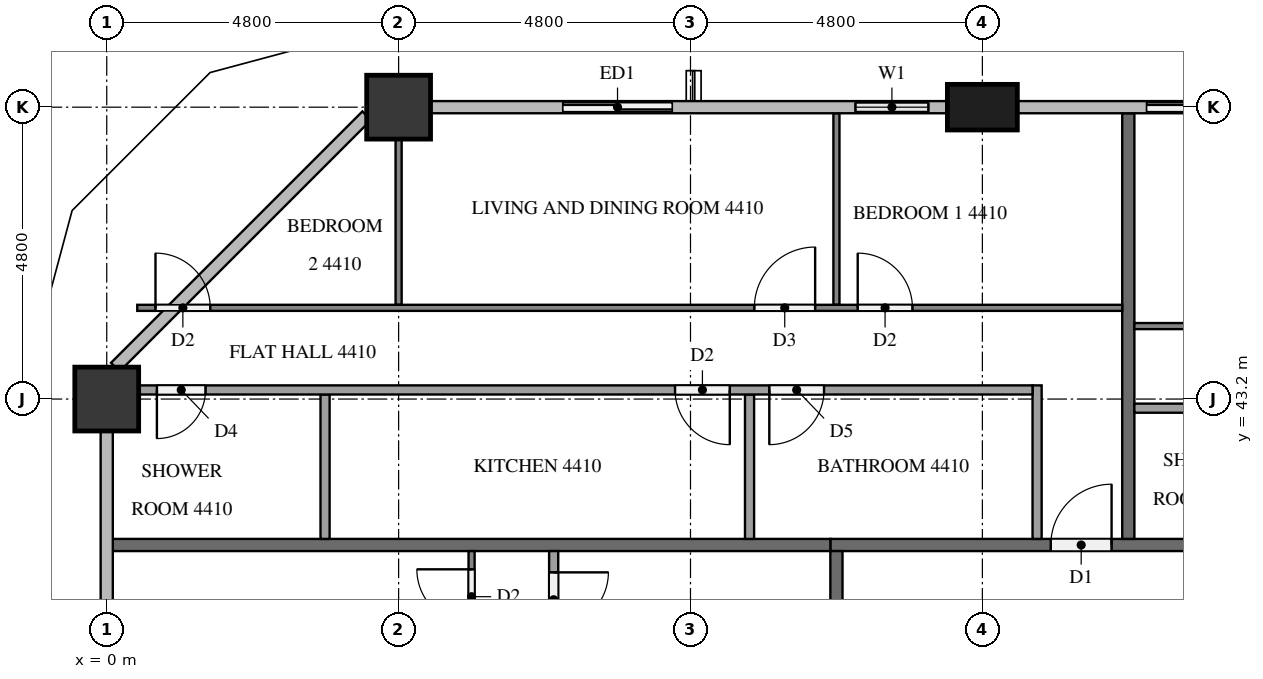
"""IFC4 building model, lengths in metres.
Left out: names, types, materials, properties, quantities, classifications, styles, units other than length and angle.
Written with IfcOpenShell. Run it as: python <this file> out.ifc"""

import sys

from ifc_helpers import new_model, si_unit, direction, frame, frame_2d, origin, origin_2d, place, context, subcontext, project, spatial, rectangle, extrude, element, fill, save


model = new_model("IFC4")
c1 = context("Model", 3, precision=1e-05, world=origin(), true_north=direction((0.0, 1.0)))
c2 = subcontext(c1, "Body", "Model", "MODEL_VIEW")
j1 = project(units=[si_unit("LENGTHUNIT", "METRE"), si_unit("PLANEANGLEUNIT", "RADIAN")], contexts=[c1])
p1 = place(None, origin())
s1 = spatial("IfcSite", under=j1, at=p1, CompositionType="ELEMENT")
p2 = place(p1, origin())
s2 = spatial("IfcBuilding", under=s1, at=p2, CompositionType="ELEMENT")
p3 = place(p2, frame((0.0, 0.0, 170.0)))
s3 = spatial("IfcBuildingStorey", under=s2, at=p3, CompositionType="ELEMENT", Elevation=170.0)
p4 = place(p3, frame((14.4, 48.0, 0.0), z_axis=(0.0, 0.0, 1.0), x_axis=(1.0, 0.0, 0.0)))
e1 = element("IfcColumn", 1, at=p4, inside=s3, PredefinedType="COLUMN", context=c2, shape_type="SweptSolid", body=[
    extrude(rectangle(XDim=1.15, YDim=0.75, at=origin_2d()), origin(), (0.0, 0.0, 1.0), 3.1),
])
for number, where, z_axis, x_axis in (
    (2, (4.8, 48.0, 0.0), (0.0, 0.0, 1.0), (1.0, 0.0, 0.0)),
    (3, (0.0, 43.2, 0.0), (0.0, 0.0, 1.0), (1.0, 0.0, 0.0)),
):
    element("IfcColumn", number, at=place(p3, frame(where, z_axis=z_axis, x_axis=x_axis)), inside=s3, PredefinedType="COLUMN", context=c2, shape_type="SweptSolid", body=[
        extrude(rectangle(XDim=1.05, YDim=1.05, at=origin_2d()), origin(), (0.0, 0.0, 1.0), 3.1),
    ])
p5 = place(p3, frame((19.2, 48.0, 0.0), z_axis=(0.0, 0.0, 1.0), x_axis=(-1.0, 0.0, 0.0)))
e4 = element("IfcWall", 4, at=p5, inside=s3, PredefinedType="SOLIDWALL", context=c2, shape_type="SweptSolid", body=[
    extrude(rectangle(XDim=2.4, YDim=0.15, at=frame_2d((1.2, 0.0))), origin(), (0.0, 0.0, 1.0), 3.1),
])
p6 = place(p5, frame((0.3, 0.0, 0.0)))
e5 = element("IfcOpeningElement", 5, at=p6, cuts=e4, PredefinedType="OPENING", context=c2, shape_type="SweptSolid", body=[
    extrude(rectangle(XDim=1.8, YDim=2.4, at=frame_2d((0.9, 1.2))), frame((0.0, 0.085, 0.0), z_axis=(0.0, -1.0, 0.0), x_axis=(1.0, 0.0, 0.0)), (0.0, 0.0, 1.0), 0.17),
])
p7 = place(p3, frame((13.825, 48.0, 0.0), z_axis=(0.0, 0.0, 1.0), x_axis=(-1.0, 0.0, 0.0)))
e6 = element("IfcWall", 6, at=p7, inside=s3, PredefinedType="SOLIDWALL", context=c2, shape_type="SweptSolid", body=[
    extrude(rectangle(XDim=1.825, YDim=0.15, at=frame_2d((0.913, 0.0))), origin(), (0.0, 0.0, 1.0), 3.1),
])
p8 = place(p7, frame((0.312, 0.0, 0.9)))
e7 = element("IfcOpeningElement", 7, at=p8, cuts=e6, PredefinedType="OPENING", context=c2, shape_type="SweptSolid", body=[
    extrude(rectangle(XDim=1.2, YDim=1.4, at=frame_2d((0.6, 0.7))), frame((0.0, 0.085, 0.0), z_axis=(0.0, -1.0, 0.0), x_axis=(1.0, 0.0, 0.0)), (0.0, 0.0, 1.0), 0.17),
])
p9 = place(p3, frame((9.6, 48.0, 0.0), z_axis=(0.0, 0.0, 1.0), x_axis=(-1.0, 0.0, 0.0)))
e8 = element("IfcWall", 8, at=p9, inside=s3, PredefinedType="SOLIDWALL", context=c2, shape_type="SweptSolid", body=[
    extrude(rectangle(XDim=2.4, YDim=0.15, at=frame_2d((1.2, 0.0))), origin(), (0.0, 0.0, 1.0), 3.1),
])
p10 = place(p9, frame((0.3, 0.0, 0.0)))
e9 = element("IfcOpeningElement", 9, at=p10, cuts=e8, PredefinedType="OPENING", context=c2, shape_type="SweptSolid", body=[
    extrude(rectangle(XDim=1.8, YDim=2.4, at=frame_2d((0.9, 1.2))), frame((0.0, 0.085, 0.0), z_axis=(0.0, -1.0, 0.0), x_axis=(1.0, 0.0, 0.0)), (0.0, 0.0, 1.0), 0.17),
])
p11 = place(p3, frame((11.9, 40.8, 0.0), z_axis=(0.0, 0.0, 1.0), x_axis=(1.0, 0.0, 0.0)))
e10 = element("IfcWall", 10, at=p11, inside=s3, PredefinedType="PARTITIONING", context=c2, shape_type="SweptSolid", body=[
    extrude(rectangle(XDim=38.6, YDim=0.2, at=frame_2d((19.3, 0.0))), origin(), (0.0, 0.0, 1.0), 3.1),
])
p12 = place(p11, frame((37.175, 0.0, 0.0)))
e11 = element("IfcOpeningElement", 11, at=p12, cuts=e10, PredefinedType="OPENING", context=c2, shape_type="SweptSolid", body=[
    extrude(rectangle(XDim=1.1, YDim=2.1, at=frame_2d((0.55, 1.05))), frame((0.0, 0.11, 0.0), z_axis=(0.0, -1.0, 0.0), x_axis=(1.0, 0.0, 0.0)), (0.0, 0.0, 1.0), 0.22),
])
p13 = place(p11, frame((18.025, 0.0, 0.0)))
e12 = element("IfcOpeningElement", 12, at=p13, cuts=e10, PredefinedType="OPENING", context=c2, shape_type="SweptSolid", body=[
    extrude(rectangle(XDim=1.0, YDim=2.1, at=frame_2d((0.5, 1.05))), frame((0.0, 0.11, 0.0), z_axis=(0.0, -1.0, 0.0), x_axis=(1.0, 0.0, 0.0)), (0.0, 0.0, 1.0), 0.22),
])
p14 = place(p11, frame((3.625, 0.0, 0.0)))
e13 = element("IfcOpeningElement", 13, at=p14, cuts=e10, PredefinedType="OPENING", context=c2, shape_type="SweptSolid", body=[
    extrude(rectangle(XDim=1.0, YDim=2.1, at=frame_2d((0.5, 1.05))), frame((0.0, 0.11, 0.0), z_axis=(0.0, -1.0, 0.0), x_axis=(1.0, 0.0, 0.0)), (0.0, 0.0, 1.0), 0.22),
])
p15 = place(p3, frame((12.0, 12.1, 0.0), z_axis=(0.0, 0.0, 1.0), x_axis=(0.0, 1.0, 0.0)))
e14 = element("IfcWall", 14, at=p15, inside=s3, PredefinedType="PARTITIONING", context=c2, shape_type="SweptSolid", body=[
    extrude(rectangle(XDim=28.6, YDim=0.2, at=frame_2d((14.3, 0.0))), origin(), (0.0, 0.0, 1.0), 3.1),
])
p16 = place(p15, frame((19.375, 0.0, 0.0)))
e15 = element("IfcOpeningElement", 15, at=p16, cuts=e14, PredefinedType="OPENING", context=c2, shape_type="SweptSolid", body=[
    extrude(rectangle(XDim=1.0, YDim=2.1, at=frame_2d((0.5, 1.05))), frame((0.0, 0.11, 0.0), z_axis=(0.0, -1.0, 0.0), x_axis=(1.0, 0.0, 0.0)), (0.0, 0.0, 1.0), 0.22),
])
p17 = place(p15, frame((4.975, 0.0, 0.0)))
e16 = element("IfcOpeningElement", 16, at=p17, cuts=e14, PredefinedType="OPENING", context=c2, shape_type="SweptSolid", body=[
    extrude(rectangle(XDim=1.0, YDim=2.1, at=frame_2d((0.5, 1.05))), frame((0.0, 0.11, 0.0), z_axis=(0.0, -1.0, 0.0), x_axis=(1.0, 0.0, 0.0)), (0.0, 0.0, 1.0), 0.22),
])
p18 = place(p15, frame((3.425, 0.0, 0.0)))
e17 = element("IfcOpeningElement", 17, at=p18, cuts=e14, PredefinedType="OPENING", context=c2, shape_type="SweptSolid", body=[
    extrude(rectangle(XDim=1.0, YDim=2.1, at=frame_2d((0.5, 1.05))), frame((0.0, 0.11, 0.0), z_axis=(0.0, -1.0, 0.0), x_axis=(1.0, 0.0, 0.0)), (0.0, 0.0, 1.0), 0.22),
])
p19 = place(p3, frame((16.8, 47.9, 0.0), z_axis=(0.0, 0.0, 1.0), x_axis=(0.0, -1.0, 0.0)))
e18 = element("IfcWall", 18, at=p19, inside=s3, PredefinedType="PARTITIONING", context=c2, shape_type="SweptSolid", body=[
    extrude(rectangle(XDim=7.0, YDim=0.2, at=frame_2d((3.5, 0.0))), origin(), (0.0, 0.0, 1.0), 3.1),
])
p20 = place(p3, frame((0.1, 40.8, 0.0), z_axis=(0.0, 0.0, 1.0), x_axis=(1.0, 0.0, 0.0)))
e19 = element("IfcWall", 19, at=p20, inside=s3, PredefinedType="PARTITIONING", context=c2, shape_type="SweptSolid", body=[
    extrude(rectangle(XDim=11.8, YDim=0.2, at=frame_2d((5.9, 0.0))), origin(), (0.0, 0.0, 1.0), 3.1),
])
p21 = place(p3, frame((16.9, 44.4, 0.0), z_axis=(0.0, 0.0, 1.0), x_axis=(1.0, 0.0, 0.0)))
e20 = element("IfcWall", 20, at=p21, inside=s3, PredefinedType="PARTITIONING", context=c2, shape_type="SweptSolid", body=[
    extrude(rectangle(XDim=14.2, YDim=0.1, at=frame_2d((7.1, 0.0))), origin(), (0.0, 0.0, 1.0), 3.1),
])
p22 = place(p21, frame((13.0, 0.0, 0.0)))
e21 = element("IfcOpeningElement", 21, at=p22, cuts=e20, PredefinedType="OPENING", context=c2, shape_type="SweptSolid", body=[
    extrude(rectangle(XDim=0.9, YDim=2.1, at=frame_2d((0.45, 1.05))), frame((0.0, 0.06, 0.0), z_axis=(0.0, -1.0, 0.0), x_axis=(1.0, 0.0, 0.0)), (0.0, 0.0, 1.0), 0.12),
])
p23 = place(p21, frame((5.05, 0.0, 0.0)))
e22 = element("IfcOpeningElement", 22, at=p23, cuts=e20, PredefinedType="OPENING", context=c2, shape_type="SweptSolid", body=[
    extrude(rectangle(XDim=0.9, YDim=2.1, at=frame_2d((0.45, 1.05))), frame((0.0, 0.06, 0.0), z_axis=(0.0, -1.0, 0.0), x_axis=(1.0, 0.0, 0.0)), (0.0, 0.0, 1.0), 0.12),
])
p24 = place(p21, frame((3.35, 0.0, 0.0)))
e23 = element("IfcOpeningElement", 23, at=p24, cuts=e20, PredefinedType="OPENING", context=c2, shape_type="SweptSolid", body=[
    extrude(rectangle(XDim=1.0, YDim=2.1, at=frame_2d((0.5, 1.05))), frame((0.0, 0.06, 0.0), z_axis=(0.0, -1.0, 0.0), x_axis=(1.0, 0.0, 0.0)), (0.0, 0.0, 1.0), 0.12),
])
p25 = place(p3, frame((29.625, 43.05, 0.0), z_axis=(0.0, 0.0, 1.0), x_axis=(-1.0, 0.0, 0.0)))
e24 = element("IfcWall", 24, at=p25, inside=s3, PredefinedType="PARTITIONING", context=c2, shape_type="SweptSolid", body=[
    extrude(rectangle(XDim=12.725, YDim=0.15, at=frame_2d((6.363, 0.0))), origin(), (0.0, 0.0, 1.0), 3.1),
])
p26 = place(p25, frame((0.3, 0.0, 0.0)))
e25 = element("IfcOpeningElement", 25, at=p26, cuts=e24, PredefinedType="OPENING", context=c2, shape_type="SweptSolid", body=[
    extrude(rectangle(XDim=0.9, YDim=2.1, at=frame_2d((0.45, 1.05))), frame((0.0, 0.085, 0.0), z_axis=(0.0, -1.0, 0.0), x_axis=(1.0, 0.0, 0.0)), (0.0, 0.0, 1.0), 0.17),
])
p27 = place(p25, frame((8.563, 0.0, 0.0)))
e26 = element("IfcOpeningElement", 26, at=p27, cuts=e24, PredefinedType="OPENING", context=c2, shape_type="SweptSolid", body=[
    extrude(rectangle(XDim=0.9, YDim=2.1, at=frame_2d((0.45, 1.05))), frame((0.0, 0.085, 0.0), z_axis=(0.0, -1.0, 0.0), x_axis=(1.0, 0.0, 0.0)), (0.0, 0.0, 1.0), 0.17),
])
p28 = place(p25, frame((10.114, 0.0, 0.0)))
e27 = element("IfcOpeningElement", 27, at=p28, cuts=e24, PredefinedType="OPENING", context=c2, shape_type="SweptSolid", body=[
    extrude(rectangle(XDim=0.8, YDim=2.1, at=frame_2d((0.4, 1.05))), frame((0.0, 0.085, 0.0), z_axis=(0.0, -1.0, 0.0), x_axis=(1.0, 0.0, 0.0)), (0.0, 0.0, 1.0), 0.17),
])
p29 = place(p3, frame((12.0, 44.75, 0.0), z_axis=(0.0, 0.0, 1.0), x_axis=(0.0, 1.0, 0.0)))
e28 = element("IfcWall", 28, at=p29, inside=s3, PredefinedType="PARTITIONING", context=c2, shape_type="SweptSolid", body=[
    extrude(rectangle(XDim=3.15, YDim=0.1, at=frame_2d((1.575, 0.0))), origin(), (0.0, 0.0, 1.0), 3.1),
])
p30 = place(p3, frame((4.8, 44.75, 0.0), z_axis=(0.0, 0.0, 1.0), x_axis=(0.0, 1.0, 0.0)))
e29 = element("IfcWall", 29, at=p30, inside=s3, PredefinedType="PARTITIONING", context=c2, shape_type="SweptSolid", body=[
    extrude(rectangle(XDim=2.725, YDim=0.1, at=frame_2d((1.363, 0.0))), origin(), (0.0, 0.0, 1.0), 3.1),
])
p31 = place(p3, frame((0.502, 44.7, 0.0), z_axis=(0.0, 0.0, 1.0), x_axis=(1.0, 0.0, 0.0)))
e30 = element("IfcWall", 30, at=p31, inside=s3, PredefinedType="PARTITIONING", context=c2, shape_type="SweptSolid", body=[
    extrude(rectangle(XDim=16.198, YDim=0.1, at=frame_2d((8.099, 0.0))), origin(), (0.0, 0.0, 1.0), 3.1),
])
p32 = place(p31, frame((11.848, 0.0, 0.0)))
e31 = element("IfcOpeningElement", 31, at=p32, cuts=e30, PredefinedType="OPENING", context=c2, shape_type="SweptSolid", body=[
    extrude(rectangle(XDim=0.9, YDim=2.1, at=frame_2d((0.45, 1.05))), frame((0.0, 0.06, 0.0), z_axis=(0.0, -1.0, 0.0), x_axis=(1.0, 0.0, 0.0)), (0.0, 0.0, 1.0), 0.12),
])
p33 = place(p31, frame((10.148, 0.0, 0.0)))
e32 = element("IfcOpeningElement", 32, at=p33, cuts=e30, PredefinedType="OPENING", context=c2, shape_type="SweptSolid", body=[
    extrude(rectangle(XDim=1.0, YDim=2.1, at=frame_2d((0.5, 1.05))), frame((0.0, 0.06, 0.0), z_axis=(0.0, -1.0, 0.0), x_axis=(1.0, 0.0, 0.0)), (0.0, 0.0, 1.0), 0.12),
])
p34 = place(p31, frame((0.3, 0.0, 0.0)))
e33 = element("IfcOpeningElement", 33, at=p34, cuts=e30, PredefinedType="OPENING", context=c2, shape_type="SweptSolid", body=[
    extrude(rectangle(XDim=0.9, YDim=2.1, at=frame_2d((0.45, 1.05))), frame((0.0, 0.06, 0.0), z_axis=(0.0, -1.0, 0.0), x_axis=(1.0, 0.0, 0.0)), (0.0, 0.0, 1.0), 0.12),
])
for number, where, z_axis, x_axis in (
    (34, (10.571, 40.9, 0.0), (0.0, 0.0, 1.0), (0.0, 1.0, 0.0)),
    (35, (3.59, 40.9, 0.0), (0.0, 0.0, 1.0), (0.0, 1.0, 0.0)),
):
    element("IfcWall", number, at=place(p3, frame(where, z_axis=z_axis, x_axis=x_axis)), inside=s3, PredefinedType="PARTITIONING", context=c2, shape_type="SweptSolid", body=[
        extrude(rectangle(XDim=2.375, YDim=0.15, at=frame_2d((1.188, 0.0))), origin(), (0.0, 0.0, 1.0), 3.1),
    ])
p35 = place(p3, frame((15.3, 40.9, 0.0), z_axis=(0.0, 0.0, 1.0), x_axis=(0.0, 1.0, 0.0)))
e36 = element("IfcWall", 36, at=p35, inside=s3, PredefinedType="PARTITIONING", context=c2, shape_type="SweptSolid", body=[
    extrude(rectangle(XDim=2.525, YDim=0.15, at=frame_2d((1.263, 0.0))), origin(), (0.0, 0.0, 1.0), 3.1),
])
p36 = place(p3, frame((15.225, 43.35, 0.0), z_axis=(0.0, 0.0, 1.0), x_axis=(-1.0, 0.0, 0.0)))
e37 = element("IfcWall", 37, at=p36, inside=s3, PredefinedType="PARTITIONING", context=c2, shape_type="SweptSolid", body=[
    extrude(rectangle(XDim=14.7, YDim=0.15, at=frame_2d((7.35, 0.0))), origin(), (0.0, 0.0, 1.0), 3.1),
])
p37 = place(p36, frame((3.429, 0.0, 0.0)))
e38 = element("IfcOpeningElement", 38, at=p37, cuts=e37, PredefinedType="OPENING", context=c2, shape_type="SweptSolid", body=[
    extrude(rectangle(XDim=0.9, YDim=2.1, at=frame_2d((0.45, 1.05))), frame((0.0, 0.085, 0.0), z_axis=(0.0, -1.0, 0.0), x_axis=(1.0, 0.0, 0.0)), (0.0, 0.0, 1.0), 0.17),
])
p38 = place(p36, frame((4.979, 0.0, 0.0)))
e39 = element("IfcOpeningElement", 39, at=p38, cuts=e37, PredefinedType="OPENING", context=c2, shape_type="SweptSolid", body=[
    extrude(rectangle(XDim=0.9, YDim=2.1, at=frame_2d((0.45, 1.05))), frame((0.0, 0.085, 0.0), z_axis=(0.0, -1.0, 0.0), x_axis=(1.0, 0.0, 0.0)), (0.0, 0.0, 1.0), 0.17),
])
p39 = place(p36, frame((13.6, 0.0, 0.0)))
e40 = element("IfcOpeningElement", 40, at=p39, cuts=e37, PredefinedType="OPENING", context=c2, shape_type="SweptSolid", body=[
    extrude(rectangle(XDim=0.8, YDim=2.1, at=frame_2d((0.4, 1.05))), frame((0.0, 0.085, 0.0), z_axis=(0.0, -1.0, 0.0), x_axis=(1.0, 0.0, 0.0)), (0.0, 0.0, 1.0), 0.17),
])
p40 = place(p3, frame((6.0, 31.3, 0.0), z_axis=(0.0, 0.0, 1.0), x_axis=(0.0, 1.0, 0.0)))
e41 = element("IfcWall", 41, at=p40, inside=s3, PredefinedType="PARTITIONING", context=c2, shape_type="SweptSolid", body=[
    extrude(rectangle(XDim=9.4, YDim=0.1, at=frame_2d((4.7, 0.0))), origin(), (0.0, 0.0, 1.0), 3.1),
])
p41 = place(p40, frame((0.3, 0.0, 0.0)))
e42 = element("IfcOpeningElement", 42, at=p41, cuts=e41, PredefinedType="OPENING", context=c2, shape_type="SweptSolid", body=[
    extrude(rectangle(XDim=1.0, YDim=2.1, at=frame_2d((0.5, 1.05))), frame((0.0, 0.06, 0.0), z_axis=(0.0, -1.0, 0.0), x_axis=(1.0, 0.0, 0.0)), (0.0, 0.0, 1.0), 0.12),
])
p42 = place(p40, frame((8.2, 0.0, 0.0)))
e43 = element("IfcOpeningElement", 43, at=p42, cuts=e41, PredefinedType="OPENING", context=c2, shape_type="SweptSolid", body=[
    extrude(rectangle(XDim=0.9, YDim=2.1, at=frame_2d((0.45, 1.05))), frame((0.0, 0.06, 0.0), z_axis=(0.0, -1.0, 0.0), x_axis=(1.0, 0.0, 0.0)), (0.0, 0.0, 1.0), 0.12),
])
p43 = place(p3, frame((7.35, 40.7, 0.0), z_axis=(0.0, 0.0, 1.0), x_axis=(0.0, -1.0, 0.0)))
e44 = element("IfcWall", 44, at=p43, inside=s3, PredefinedType="PARTITIONING", context=c2, shape_type="SweptSolid", body=[
    extrude(rectangle(XDim=7.925, YDim=0.15, at=frame_2d((3.962, 0.0))), origin(), (0.0, 0.0, 1.0), 3.1),
])
p44 = place(p43, frame((6.825, 0.0, 0.0)))
e45 = element("IfcOpeningElement", 45, at=p44, cuts=e44, PredefinedType="OPENING", context=c2, shape_type="SweptSolid", body=[
    extrude(rectangle(XDim=0.8, YDim=2.1, at=frame_2d((0.4, 1.05))), frame((0.0, 0.085, 0.0), z_axis=(0.0, -1.0, 0.0), x_axis=(1.0, 0.0, 0.0)), (0.0, 0.0, 1.0), 0.17),
])
p45 = place(p43, frame((0.35, 0.0, 0.0)))
e46 = element("IfcOpeningElement", 46, at=p45, cuts=e44, PredefinedType="OPENING", context=c2, shape_type="SweptSolid", body=[
    extrude(rectangle(XDim=0.9, YDim=2.1, at=frame_2d((0.45, 1.05))), frame((0.0, 0.085, 0.0), z_axis=(0.0, -1.0, 0.0), x_axis=(1.0, 0.0, 0.0)), (0.0, 0.0, 1.0), 0.17),
])
p46 = place(p6, origin())
e47 = element("IfcDoor", 47, at=p46, inside=s3, OperationType="SLIDING_TO_LEFT", PredefinedType="DOOR", context=c2, shape_type="SweptSolid", body=[
    extrude(rectangle(XDim=1.8, YDim=2.4, at=frame_2d((0.9, 1.2))), frame((0.0, 0.025, 0.0), z_axis=(0.0, -1.0, 0.0), x_axis=(1.0, 0.0, 0.0)), (0.0, 0.0, 1.0), 0.05),
])
fill(e5, e47)
p47 = place(p8, origin())
e48 = element("IfcWindow", 48, at=p47, inside=s3, PartitioningType="SINGLE_PANEL", PredefinedType="WINDOW", context=c2, shape_type="SweptSolid", body=[
    extrude(rectangle(XDim=1.2, YDim=1.4, at=frame_2d((0.6, 0.7))), frame((0.0, 0.03, 0.0), z_axis=(0.0, -1.0, 0.0), x_axis=(1.0, 0.0, 0.0)), (0.0, 0.0, 1.0), 0.06),
])
fill(e7, e48)
p48 = place(p10, origin())
e49 = element("IfcDoor", 49, at=p48, inside=s3, OperationType="SLIDING_TO_RIGHT", PredefinedType="DOOR", context=c2, shape_type="SweptSolid", body=[
    extrude(rectangle(XDim=1.8, YDim=2.4, at=frame_2d((0.9, 1.2))), frame((0.0, 0.025, 0.0), z_axis=(0.0, -1.0, 0.0), x_axis=(1.0, 0.0, 0.0)), (0.0, 0.0, 1.0), 0.05),
])
fill(e9, e49)
p49 = place(p14, origin())
e50 = element("IfcDoor", 50, at=p49, inside=s3, OperationType="SINGLE_SWING_RIGHT", PredefinedType="DOOR", context=c2, shape_type="SweptSolid", body=[
    extrude(rectangle(XDim=1.0, YDim=2.1, at=frame_2d((0.5, 1.05))), frame((0.0, 0.025, 0.0), z_axis=(0.0, -1.0, 0.0), x_axis=(1.0, 0.0, 0.0)), (0.0, 0.0, 1.0), 0.05),
])
fill(e13, e50)
p50 = place(p32, origin())
e51 = element("IfcDoor", 51, at=p50, inside=s3, OperationType="SINGLE_SWING_LEFT", PredefinedType="DOOR", context=c2, shape_type="SweptSolid", body=[
    extrude(rectangle(XDim=0.9, YDim=2.1, at=frame_2d((0.45, 1.05))), frame((0.0, 0.025, 0.0), z_axis=(0.0, -1.0, 0.0), x_axis=(1.0, 0.0, 0.0)), (0.0, 0.0, 1.0), 0.05),
])
fill(e31, e51)
p51 = place(p33, origin())
e52 = element("IfcDoor", 52, at=p51, inside=s3, OperationType="SINGLE_SWING_RIGHT", PredefinedType="DOOR", context=c2, shape_type="SweptSolid", body=[
    extrude(rectangle(XDim=1.0, YDim=2.1, at=frame_2d((0.5, 1.05))), frame((0.0, 0.025, 0.0), z_axis=(0.0, -1.0, 0.0), x_axis=(1.0, 0.0, 0.0)), (0.0, 0.0, 1.0), 0.05),
])
fill(e32, e52)
p52 = place(p34, origin())
e53 = element("IfcDoor", 53, at=p52, inside=s3, OperationType="SINGLE_SWING_LEFT", PredefinedType="DOOR", context=c2, shape_type="SweptSolid", body=[
    extrude(rectangle(XDim=0.9, YDim=2.1, at=frame_2d((0.45, 1.05))), frame((0.0, 0.025, 0.0), z_axis=(0.0, -1.0, 0.0), x_axis=(1.0, 0.0, 0.0)), (0.0, 0.0, 1.0), 0.05),
])
fill(e33, e53)
p53 = place(p37, origin())
e54 = element("IfcDoor", 54, at=p53, inside=s3, OperationType="SINGLE_SWING_RIGHT", PredefinedType="DOOR", context=c2, shape_type="SweptSolid", body=[
    extrude(rectangle(XDim=0.9, YDim=2.1, at=frame_2d((0.45, 1.05))), frame((0.0, 0.025, 0.0), z_axis=(0.0, -1.0, 0.0), x_axis=(1.0, 0.0, 0.0)), (0.0, 0.0, 1.0), 0.05),
])
fill(e38, e54)
p54 = place(p38, origin())
e55 = element("IfcDoor", 55, at=p54, inside=s3, OperationType="SINGLE_SWING_LEFT", PredefinedType="DOOR", context=c2, shape_type="SweptSolid", body=[
    extrude(rectangle(XDim=0.9, YDim=2.1, at=frame_2d((0.45, 1.05))), frame((0.0, 0.025, 0.0), z_axis=(0.0, -1.0, 0.0), x_axis=(1.0, 0.0, 0.0)), (0.0, 0.0, 1.0), 0.05),
])
fill(e39, e55)
p55 = place(p39, origin())
e56 = element("IfcDoor", 56, at=p55, inside=s3, OperationType="SINGLE_SWING_RIGHT", PredefinedType="DOOR", context=c2, shape_type="SweptSolid", body=[
    extrude(rectangle(XDim=0.8, YDim=2.1, at=frame_2d((0.4, 1.05))), frame((0.0, 0.025, 0.0), z_axis=(0.0, -1.0, 0.0), x_axis=(1.0, 0.0, 0.0)), (0.0, 0.0, 1.0), 0.05),
])
fill(e40, e56)
p56 = place(p42, origin())
e57 = element("IfcDoor", 57, at=p56, inside=s3, OperationType="SINGLE_SWING_RIGHT", PredefinedType="DOOR", context=c2, shape_type="SweptSolid", body=[
    extrude(rectangle(XDim=0.9, YDim=2.1, at=frame_2d((0.45, 1.05))), frame((0.0, 0.025, 0.0), z_axis=(0.0, -1.0, 0.0), x_axis=(1.0, 0.0, 0.0)), (0.0, 0.0, 1.0), 0.05),
])
fill(e43, e57)
p57 = place(p45, origin())
e58 = element("IfcDoor", 58, at=p57, inside=s3, OperationType="SINGLE_SWING_LEFT", PredefinedType="DOOR", context=c2, shape_type="SweptSolid", body=[
    extrude(rectangle(XDim=0.9, YDim=2.1, at=frame_2d((0.45, 1.05))), frame((0.0, 0.025, 0.0), z_axis=(0.0, -1.0, 0.0), x_axis=(1.0, 0.0, 0.0)), (0.0, 0.0, 1.0), 0.05),
])
fill(e46, e58)
save(model, sys.argv[1])
